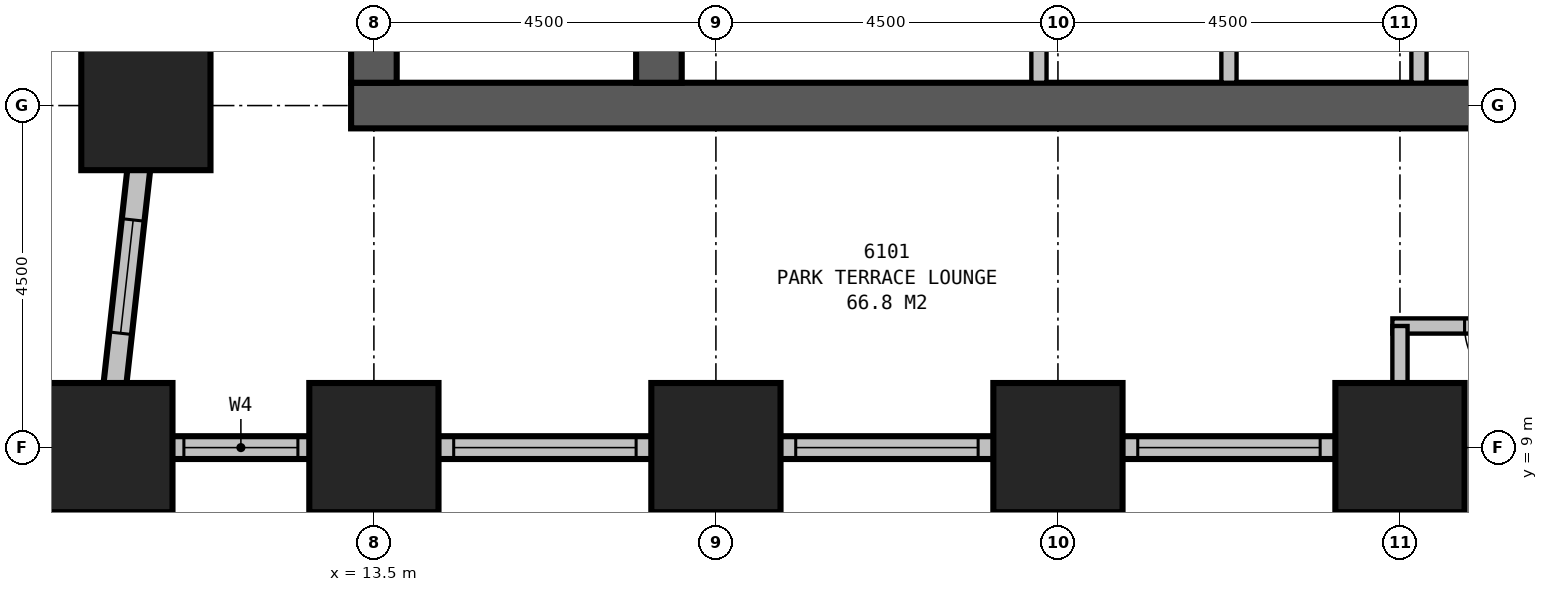
"""IFC4 building model, lengths in metres.
Left out: names, types, materials, properties, quantities, classifications, styles, units other than length and angle.
Written with IfcOpenShell. Run it as: python <this file> out.ifc"""

import sys

from ifc_helpers import new_model, si_unit, direction, frame, frame_2d, origin, origin_2d, place, context, subcontext, project, spatial, rectangle, extrude, element, fill, save


model = new_model("IFC4")
c1 = context("Model", 3, precision=1e-05, world=origin(), true_north=direction((0.0, 1.0)))
c2 = subcontext(c1, "Body", "Model", "MODEL_VIEW")
j1 = project(units=[si_unit("LENGTHUNIT", "METRE"), si_unit("PLANEANGLEUNIT", "RADIAN")], contexts=[c1])
p1 = place(None, origin())
s1 = spatial("IfcSite", under=j1, at=p1, CompositionType="ELEMENT")
p2 = place(p1, origin())
s2 = spatial("IfcBuilding", under=s1, at=p2, CompositionType="ELEMENT")
p3 = place(p2, frame((0.0, 0.0, 236.9)))
s3 = spatial("IfcBuildingStorey", under=s2, at=p3, CompositionType="ELEMENT", Elevation=236.9)
for number, where, z_axis, x_axis in (
    (1, (10.0, 9.0, 0.0), (0.0, 0.0, 1.0), (1.0, 0.0, 0.0)),
    (2, (13.5, 9.0, 0.0), (0.0, 0.0, 1.0), (1.0, 0.0, 0.0)),
    (3, (18.0, 9.0, 0.0), (0.0, 0.0, 1.0), (1.0, 0.0, 0.0)),
    (4, (22.5, 9.0, 0.0), (0.0, 0.0, 1.0), (1.0, 0.0, 0.0)),
    (5, (27.0, 9.0, 0.0), (0.0, 0.0, 1.0), (1.0, 0.0, 0.0)),
    (6, (10.5, 13.5, 0.0), (0.0, 0.0, 1.0), (1.0, 0.0, 0.0)),
):
    element("IfcColumn", number, at=place(p3, frame(where, z_axis=z_axis, x_axis=x_axis)), inside=s3, PredefinedType="COLUMN", context=c2, shape_type="SweptSolid", body=[
        extrude(rectangle(XDim=1.7, YDim=1.7, at=origin_2d()), origin(), (0.0, 0.0, 1.0), 3.9),
    ])
p4 = place(p3, frame((13.2, 13.5, 0.0), z_axis=(0.0, 0.0, 1.0), x_axis=(1.0, 0.0, 0.0)))
e7 = element("IfcWall", 7, at=p4, inside=s3, PredefinedType="SHEAR", context=c2, shape_type="SweptSolid", body=[
    extrude(rectangle(XDim=23.1, YDim=0.6, at=frame_2d((11.55, 0.0))), origin(), (0.0, 0.0, 1.0), 3.9),
])
p5 = place(p3, frame((17.25, 13.8, 0.0), z_axis=(0.0, 0.0, 1.0), x_axis=(0.0, 1.0, 0.0)))
e8 = element("IfcWall", 8, at=p5, inside=s3, PredefinedType="SHEAR", context=c2, shape_type="SweptSolid", body=[
    extrude(rectangle(XDim=12.9, YDim=0.6, at=frame_2d((6.45, 0.0))), origin(), (0.0, 0.0, 1.0), 3.9),
])
p6 = place(p5, frame((3.85, 0.0, 0.0)))
e9 = element("IfcOpeningElement", 9, at=p6, cuts=e8, PredefinedType="OPENING", context=c2, shape_type="SweptSolid", body=[
    extrude(rectangle(XDim=1.2, YDim=2.1, at=frame_2d((0.6, 1.05))), frame((0.0, 0.31, 0.0), z_axis=(0.0, -1.0, 0.0), x_axis=(1.0, 0.0, 0.0)), (0.0, 0.0, 1.0), 0.62),
])
p7 = place(p3, frame((13.5, 16.5, 0.0), z_axis=(0.0, 0.0, 1.0), x_axis=(0.0, -1.0, 0.0)))
e10 = element("IfcWall", 10, at=p7, inside=s3, PredefinedType="SHEAR", context=c2, shape_type="SweptSolid", body=[
    extrude(rectangle(XDim=2.7, YDim=0.6, at=frame_2d((1.35, 0.0))), origin(), (0.0, 0.0, 1.0), 3.9),
])
p8 = place(p3, frame((9.85, 9.0, 0.0), z_axis=(0.0, 0.0, 1.0), x_axis=(1.0, 0.0, 0.0)))
e11 = element("IfcWall", 11, at=p8, inside=s3, PredefinedType="STANDARD", context=c2, shape_type="SweptSolid", body=[
    extrude(rectangle(XDim=17.3, YDim=0.3, at=frame_2d((8.65, 0.0))), origin(), (0.0, 0.0, 1.0), 2.5),
])
p9 = place(p8, frame((1.15, 0.0, 0.5)))
e12 = element("IfcOpeningElement", 12, at=p9, cuts=e11, PredefinedType="OPENING", context=c2, shape_type="SweptSolid", body=[
    extrude(rectangle(XDim=1.5, YDim=1.85, at=frame_2d((0.75, 0.925))), frame((0.0, 0.16, 0.0), z_axis=(0.0, -1.0, 0.0), x_axis=(1.0, 0.0, 0.0)), (0.0, 0.0, 1.0), 0.32),
])
p10 = place(p8, frame((4.7, 0.0, 0.5)))
e13 = element("IfcOpeningElement", 13, at=p10, cuts=e11, PredefinedType="OPENING", context=c2, shape_type="SweptSolid", body=[
    extrude(rectangle(XDim=2.4, YDim=1.85, at=frame_2d((1.2, 0.925))), frame((0.0, 0.16, 0.0), z_axis=(0.0, -1.0, 0.0), x_axis=(1.0, 0.0, 0.0)), (0.0, 0.0, 1.0), 0.32),
])
p11 = place(p8, frame((9.2, 0.0, 0.5)))
e14 = element("IfcOpeningElement", 14, at=p11, cuts=e11, PredefinedType="OPENING", context=c2, shape_type="SweptSolid", body=[
    extrude(rectangle(XDim=2.4, YDim=1.85, at=frame_2d((1.2, 0.925))), frame((0.0, 0.16, 0.0), z_axis=(0.0, -1.0, 0.0), x_axis=(1.0, 0.0, 0.0)), (0.0, 0.0, 1.0), 0.32),
])
p12 = place(p8, frame((13.7, 0.0, 0.5)))
e15 = element("IfcOpeningElement", 15, at=p12, cuts=e11, PredefinedType="OPENING", context=c2, shape_type="SweptSolid", body=[
    extrude(rectangle(XDim=2.4, YDim=1.85, at=frame_2d((1.2, 0.925))), frame((0.0, 0.16, 0.0), z_axis=(0.0, -1.0, 0.0), x_axis=(1.0, 0.0, 0.0)), (0.0, 0.0, 1.0), 0.32),
])
p13 = place(p3, frame((27.0, 9.15, 0.0), z_axis=(0.0, 0.0, 1.0), x_axis=(0.0, -1.0, 0.0)))
e16 = element("IfcWall", 16, at=p13, inside=s3, PredefinedType="STANDARD", context=c2, shape_type="SweptSolid", body=[
    extrude(rectangle(XDim=9.3, YDim=0.3, at=frame_2d((4.65, 0.0))), origin(), (0.0, 0.0, 1.0), 2.5),
])
p14 = place(p13, frame((1.2, 0.0, 0.5)))
e17 = element("IfcOpeningElement", 17, at=p14, cuts=e16, PredefinedType="OPENING", context=c2, shape_type="SweptSolid", body=[
    extrude(rectangle(XDim=2.4, YDim=1.85, at=frame_2d((1.2, 0.925))), frame((0.0, 0.16, 0.0), z_axis=(0.0, -1.0, 0.0), x_axis=(1.0, 0.0, 0.0)), (0.0, 0.0, 1.0), 0.32),
])
p15 = place(p13, frame((5.7, 0.0, 0.5)))
e18 = element("IfcOpeningElement", 18, at=p15, cuts=e16, PredefinedType="OPENING", context=c2, shape_type="SweptSolid", body=[
    extrude(rectangle(XDim=2.4, YDim=1.85, at=frame_2d((1.2, 0.925))), frame((0.0, 0.16, 0.0), z_axis=(0.0, -1.0, 0.0), x_axis=(1.0, 0.0, 0.0)), (0.0, 0.0, 1.0), 0.32),
])
p16 = place(p3, frame((13.517, 40.649, 0.0), z_axis=(0.0, 0.0, 1.0), x_axis=(-0.110433201132, -0.993883548555, 0.0)))
e19 = element("IfcWall", 19, at=p16, inside=s3, PredefinedType="STANDARD", context=c2, shape_type="SweptSolid", body=[
    extrude(rectangle(XDim=31.994, YDim=0.3, at=frame_2d((15.997, 0.0))), origin(), (0.0, 0.0, 1.0), 2.5),
])
p17 = place(p16, frame((1.664, 0.0, 0.5)))
e20 = element("IfcOpeningElement", 20, at=p17, cuts=e19, PredefinedType="OPENING", context=c2, shape_type="SweptSolid", body=[
    extrude(rectangle(XDim=1.5, YDim=1.85, at=frame_2d((0.75, 0.925))), frame((0.0, 0.16, 0.0), z_axis=(0.0, -1.0, 0.0), x_axis=(1.0, 0.0, 0.0)), (0.0, 0.0, 1.0), 0.32),
])
p18 = place(p16, frame((6.192, 0.0, 0.5)))
e21 = element("IfcOpeningElement", 21, at=p18, cuts=e19, PredefinedType="OPENING", context=c2, shape_type="SweptSolid", body=[
    extrude(rectangle(XDim=1.5, YDim=1.85, at=frame_2d((0.75, 0.925))), frame((0.0, 0.16, 0.0), z_axis=(0.0, -1.0, 0.0), x_axis=(1.0, 0.0, 0.0)), (0.0, 0.0, 1.0), 0.32),
])
p19 = place(p16, frame((15.247, 0.0, 0.5)))
e22 = element("IfcOpeningElement", 22, at=p19, cuts=e19, PredefinedType="OPENING", context=c2, shape_type="SweptSolid", body=[
    extrude(rectangle(XDim=1.5, YDim=1.85, at=frame_2d((0.75, 0.925))), frame((0.0, 0.16, 0.0), z_axis=(0.0, -1.0, 0.0), x_axis=(1.0, 0.0, 0.0)), (0.0, 0.0, 1.0), 0.32),
])
p20 = place(p16, frame((19.775, 0.0, 0.5)))
e23 = element("IfcOpeningElement", 23, at=p20, cuts=e19, PredefinedType="OPENING", context=c2, shape_type="SweptSolid", body=[
    extrude(rectangle(XDim=1.5, YDim=1.85, at=frame_2d((0.75, 0.925))), frame((0.0, 0.16, 0.0), z_axis=(0.0, -1.0, 0.0), x_axis=(1.0, 0.0, 0.0)), (0.0, 0.0, 1.0), 0.32),
])
p21 = place(p16, frame((24.302, 0.0, 0.5)))
e24 = element("IfcOpeningElement", 24, at=p21, cuts=e19, PredefinedType="OPENING", context=c2, shape_type="SweptSolid", body=[
    extrude(rectangle(XDim=1.5, YDim=1.85, at=frame_2d((0.75, 0.925))), frame((0.0, 0.16, 0.0), z_axis=(0.0, -1.0, 0.0), x_axis=(1.0, 0.0, 0.0)), (0.0, 0.0, 1.0), 0.32),
])
p22 = place(p16, frame((28.83, 0.0, 0.5)))
e25 = element("IfcOpeningElement", 25, at=p22, cuts=e19, PredefinedType="OPENING", context=c2, shape_type="SweptSolid", body=[
    extrude(rectangle(XDim=1.5, YDim=1.85, at=frame_2d((0.75, 0.925))), frame((0.0, 0.16, 0.0), z_axis=(0.0, -1.0, 0.0), x_axis=(1.0, 0.0, 0.0)), (0.0, 0.0, 1.0), 0.32),
])
p23 = place(p3, frame((26.9, 10.6, 0.0), z_axis=(0.0, 0.0, 1.0), x_axis=(1.0, 0.0, 0.0)))
e26 = element("IfcWall", 26, at=p23, inside=s3, PredefinedType="PARTITIONING", context=c2, shape_type="SweptSolid", body=[
    extrude(rectangle(XDim=11.4, YDim=0.2, at=frame_2d((5.7, 0.0))), origin(), (0.0, 0.0, 1.0), 3.65),
])
p24 = place(p23, frame((1.85, 0.0, 0.0), z_axis=(0.0, 0.0, 1.0), x_axis=(-1.0, 0.0, 0.0)))
e27 = element("IfcOpeningElement", 27, at=p24, cuts=e26, PredefinedType="OPENING", context=c2, shape_type="SweptSolid", body=[
    extrude(rectangle(XDim=0.9, YDim=2.1, at=frame_2d((0.45, 1.05))), frame((0.0, 0.11, 0.0), z_axis=(0.0, -1.0, 0.0), x_axis=(1.0, 0.0, 0.0)), (0.0, 0.0, 1.0), 0.22),
])
p25 = place(p23, frame((10.7, 0.0, 0.0), z_axis=(0.0, 0.0, 1.0), x_axis=(-1.0, 0.0, 0.0)))
e28 = element("IfcOpeningElement", 28, at=p25, cuts=e26, PredefinedType="OPENING", context=c2, shape_type="SweptSolid", body=[
    extrude(rectangle(XDim=0.9, YDim=2.1, at=frame_2d((0.45, 1.05))), frame((0.0, 0.11, 0.0), z_axis=(0.0, -1.0, 0.0), x_axis=(1.0, 0.0, 0.0)), (0.0, 0.0, 1.0), 0.22),
])
p26 = place(p3, frame((27.0, 10.6, 0.0), z_axis=(0.0, 0.0, 1.0), x_axis=(0.0, -1.0, 0.0)))
e29 = element("IfcWall", 29, at=p26, inside=s3, PredefinedType="PARTITIONING", context=c2, shape_type="SweptSolid", body=[
    extrude(rectangle(XDim=1.6, YDim=0.2, at=frame_2d((0.8, 0.0))), origin(), (0.0, 0.0, 1.0), 2.65),
])
for number, where, z_axis, x_axis in (
    (30, (22.25, 13.8, 0.0), (0.0, 0.0, 1.0), (0.0, 1.0, 0.0)),
    (31, (24.75, 13.8, 0.0), (0.0, 0.0, 1.0), (0.0, 1.0, 0.0)),
    (32, (27.25, 13.8, 0.0), (0.0, 0.0, 1.0), (0.0, 1.0, 0.0)),
):
    element("IfcWall", number, at=place(p3, frame(where, z_axis=z_axis, x_axis=x_axis)), inside=s3, PredefinedType="PARTITIONING", context=c2, shape_type="SweptSolid", body=[
        extrude(rectangle(XDim=2.4, YDim=0.2, at=frame_2d((1.2, 0.0))), origin(), (0.0, 0.0, 1.0), 3.65),
    ])
p27 = place(p9, origin())
e33 = element("IfcWindow", 33, at=p27, inside=s3, PartitioningType="SINGLE_PANEL", PredefinedType="WINDOW", context=c2, shape_type="SweptSolid", body=[
    extrude(rectangle(XDim=1.5, YDim=1.85, at=frame_2d((0.75, 0.925))), frame((0.0, 0.03, 0.0), z_axis=(0.0, -1.0, 0.0), x_axis=(1.0, 0.0, 0.0)), (0.0, 0.0, 1.0), 0.06),
])
fill(e12, e33)
p28 = place(p10, origin())
e34 = element("IfcWindow", 34, at=p28, inside=s3, PartitioningType="SINGLE_PANEL", PredefinedType="WINDOW", context=c2, shape_type="SweptSolid", body=[
    extrude(rectangle(XDim=2.4, YDim=1.85, at=frame_2d((1.2, 0.925))), frame((0.0, 0.03, 0.0), z_axis=(0.0, -1.0, 0.0), x_axis=(1.0, 0.0, 0.0)), (0.0, 0.0, 1.0), 0.06),
])
fill(e13, e34)
p29 = place(p11, origin())
e35 = element("IfcWindow", 35, at=p29, inside=s3, PartitioningType="SINGLE_PANEL", PredefinedType="WINDOW", context=c2, shape_type="SweptSolid", body=[
    extrude(rectangle(XDim=2.4, YDim=1.85, at=frame_2d((1.2, 0.925))), frame((0.0, 0.03, 0.0), z_axis=(0.0, -1.0, 0.0), x_axis=(1.0, 0.0, 0.0)), (0.0, 0.0, 1.0), 0.06),
])
fill(e14, e35)
p30 = place(p12, origin())
e36 = element("IfcWindow", 36, at=p30, inside=s3, PartitioningType="SINGLE_PANEL", PredefinedType="WINDOW", context=c2, shape_type="SweptSolid", body=[
    extrude(rectangle(XDim=2.4, YDim=1.85, at=frame_2d((1.2, 0.925))), frame((0.0, 0.03, 0.0), z_axis=(0.0, -1.0, 0.0), x_axis=(1.0, 0.0, 0.0)), (0.0, 0.0, 1.0), 0.06),
])
fill(e15, e36)
p31 = place(p22, origin())
e37 = element("IfcWindow", 37, at=p31, inside=s3, PartitioningType="SINGLE_PANEL", PredefinedType="WINDOW", context=c2, shape_type="SweptSolid", body=[
    extrude(rectangle(XDim=1.5, YDim=1.85, at=frame_2d((0.75, 0.925))), frame((0.0, 0.03, 0.0), z_axis=(0.0, -1.0, 0.0), x_axis=(1.0, 0.0, 0.0)), (0.0, 0.0, 1.0), 0.06),
])
fill(e25, e37)
p32 = place(p24, origin())
e38 = element("IfcDoor", 38, at=p32, inside=s3, OperationType="SINGLE_SWING_LEFT", PredefinedType="DOOR", context=c2, shape_type="SweptSolid", body=[
    extrude(rectangle(XDim=0.9, YDim=2.1, at=frame_2d((0.45, 1.05))), frame((0.0, 0.025, 0.0), z_axis=(0.0, -1.0, 0.0), x_axis=(1.0, 0.0, 0.0)), (0.0, 0.0, 1.0), 0.05),
])
fill(e27, e38)
save(model, sys.argv[1])
